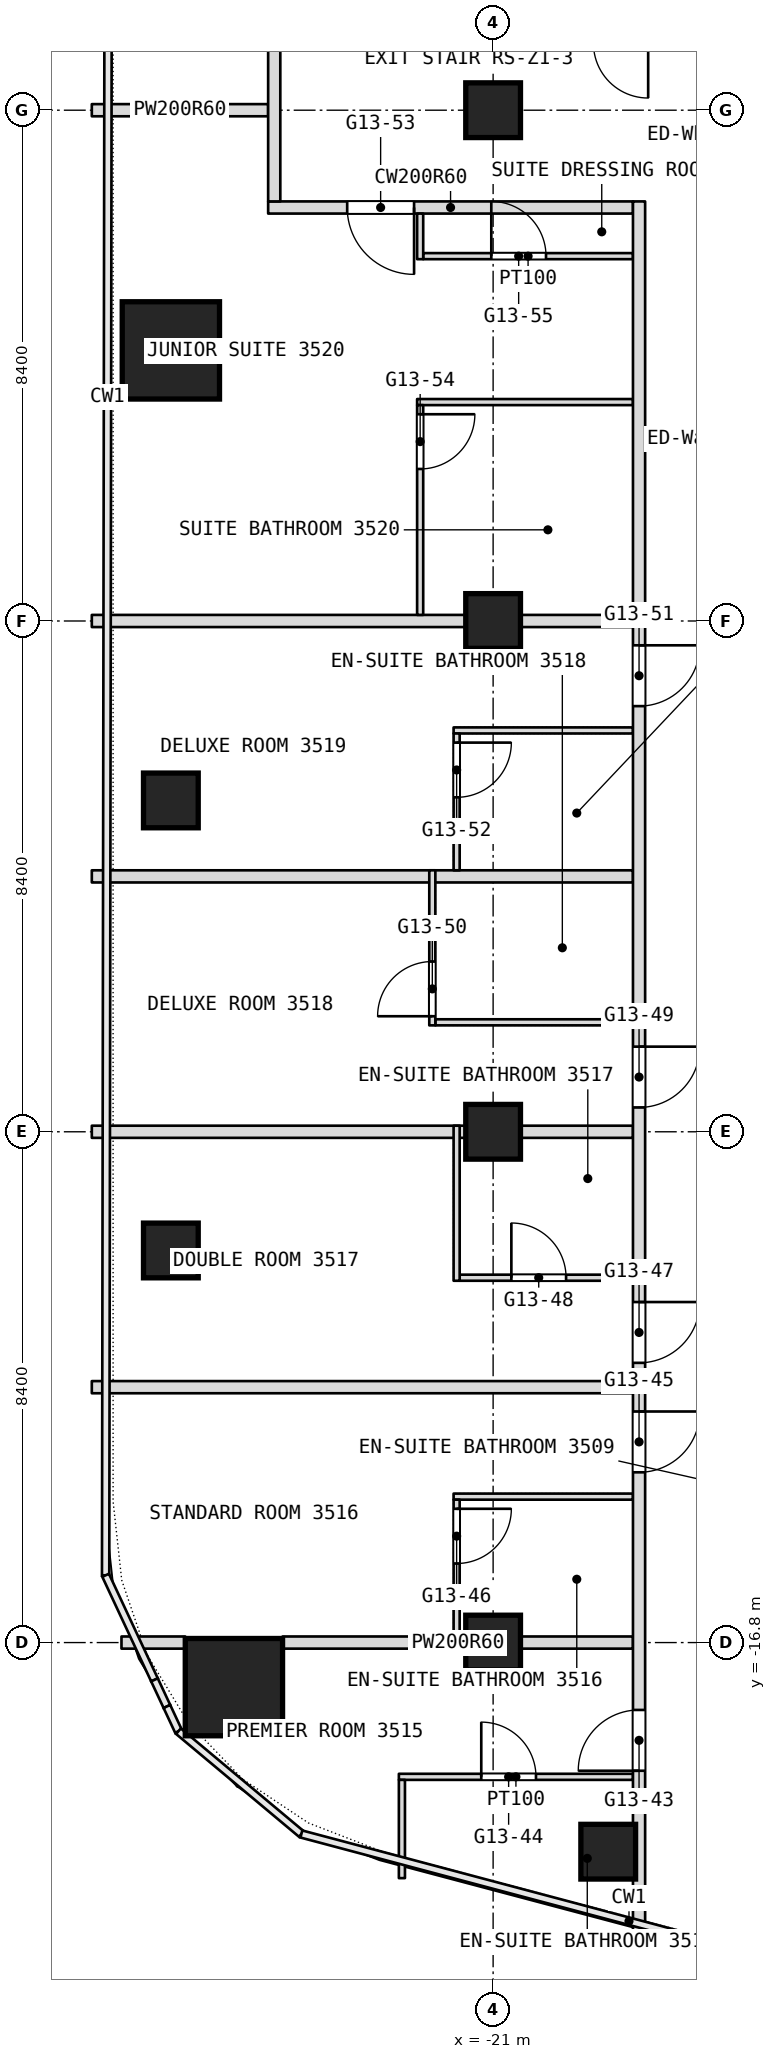
"""IFC4 building model, lengths in metres.
Left out: names, types, materials, properties, quantities, classifications, styles, units other than length and angle.
Written with IfcOpenShell. Run it as: python <this file> out.ifc"""

import sys

from ifc_helpers import new_model, si_unit, direction, frame, frame_2d, origin, origin_2d, place, context, subcontext, project, spatial, rectangle, extrude, element, fill, save


model = new_model("IFC4")
c1 = context("Model", 3, precision=1e-05, world=origin(), true_north=direction((0.0, 1.0)))
c2 = subcontext(c1, "Body", "Model", "MODEL_VIEW")
j1 = project(units=[si_unit("LENGTHUNIT", "METRE"), si_unit("PLANEANGLEUNIT", "RADIAN")], contexts=[c1])
p1 = place(None, origin())
s1 = spatial("IfcSite", under=j1, at=p1, CompositionType="ELEMENT")
p2 = place(p1, origin())
s2 = spatial("IfcBuilding", under=s1, at=p2, CompositionType="ELEMENT")
p3 = place(p2, frame((0.0, 0.0, 151.7)))
s3 = spatial("IfcBuildingStorey", under=s2, at=p3, CompositionType="ELEMENT", Elevation=151.7)
for number, where, z_axis, x_axis in (
    (1, (-25.263, -17.533, 0.0), (0.0, 0.0, 1.0), (1.0, 0.0, 0.0)),
    (2, (-26.3, 4.45, 0.0), (0.0, 0.0, 1.0), (1.0, 0.0, 0.0)),
):
    element("IfcColumn", number, at=place(p3, frame(where, z_axis=z_axis, x_axis=x_axis)), inside=s3, PredefinedType="COLUMN", context=c2, shape_type="SweptSolid", body=[
        extrude(rectangle(XDim=1.6, YDim=1.6, at=origin_2d()), origin(), (0.0, 0.0, 1.0), 3.6),
    ])
for number, where, z_axis, x_axis in (
    (3, (-21.0, -16.8, 0.0), (0.0, 0.0, 1.0), (1.0, 0.0, 0.0)),
    (4, (-21.0, -8.4, 0.0), (0.0, 0.0, 1.0), (1.0, 0.0, 0.0)),
    (5, (-21.0, 0.0, 0.0), (0.0, 0.0, 1.0), (1.0, 0.0, 0.0)),
    (6, (-21.0, 8.4, 0.0), (0.0, 0.0, 1.0), (1.0, 0.0, 0.0)),
    (7, (-26.3, -10.352, 0.0), (0.0, 0.0, 1.0), (1.0, 0.0, 0.0)),
    (8, (-26.3, -2.951, 0.0), (0.0, 0.0, 1.0), (1.0, 0.0, 0.0)),
    (9, (-19.107, -20.239, 0.0), (0.0, 0.0, 1.0), (1.0, 0.0, 0.0)),
):
    element("IfcColumn", number, at=place(p3, frame(where, z_axis=z_axis, x_axis=x_axis)), inside=s3, PredefinedType="COLUMN", context=c2, shape_type="SweptSolid", body=[
        extrude(rectangle(XDim=0.9, YDim=0.9, at=origin_2d()), origin(), (0.0, 0.0, 1.0), 3.6),
    ])
p4 = place(p3, frame((-22.55, -19.008, 0.0), z_axis=(0.0, 0.0, 1.0), x_axis=(1.0, 0.0, 0.0)))
e10 = element("IfcWall", 10, at=p4, inside=s3, PredefinedType="PARTITIONING", context=c2, shape_type="SweptSolid", body=[
    extrude(rectangle(XDim=3.85, YDim=0.1, at=frame_2d((1.925, 0.0))), origin(), (0.0, 0.0, 1.0), 3.34),
])
p5 = place(p4, frame((1.355, 0.0, 0.0)))
e11 = element("IfcOpeningElement", 11, at=p5, cuts=e10, PredefinedType="OPENING", context=c2, shape_type="SweptSolid", body=[
    extrude(rectangle(XDim=0.9, YDim=2.1, at=frame_2d((0.45, 1.05))), frame((0.0, 0.05, 0.0), z_axis=(0.0, -1.0, 0.0), x_axis=(1.0, 0.0, 0.0)), (0.0, 0.0, 1.0), 0.1),
])
p6 = place(p3, frame((-27.112, -16.8, 0.0), z_axis=(0.0, 0.0, 1.0), x_axis=(1.0, 0.0, 0.0)))
e12 = element("IfcWall", 12, at=p6, inside=s3, PredefinedType="PARTITIONING", context=c2, shape_type="SweptSolid", body=[
    extrude(rectangle(XDim=1.049, YDim=0.2, at=frame_2d((0.524, 0.0))), origin(), (0.0, 0.0, 1.0), 3.34),
])
p7 = place(p3, frame((-24.463, -16.8, 0.0), z_axis=(0.0, 0.0, 1.0), x_axis=(1.0, 0.0, 0.0)))
e13 = element("IfcWall", 13, at=p7, inside=s3, PredefinedType="PARTITIONING", context=c2, shape_type="SweptSolid", body=[
    extrude(rectangle(XDim=5.763, YDim=0.2, at=frame_2d((2.881, 0.0))), origin(), (0.0, 0.0, 1.0), 2.89),
])
p8 = place(p3, frame((-21.65, -14.4, 0.0), z_axis=(0.0, 0.0, 1.0), x_axis=(1.0, 0.0, 0.0)))
e14 = element("IfcWall", 14, at=p8, inside=s3, PredefinedType="PARTITIONING", context=c2, shape_type="SweptSolid", body=[
    extrude(rectangle(XDim=2.95, YDim=0.1, at=frame_2d((1.475, 0.0))), origin(), (0.0, 0.0, 1.0), 3.34),
])
p9 = place(p3, frame((-27.6, -12.6, 0.0), z_axis=(0.0, 0.0, 1.0), x_axis=(1.0, 0.0, 0.0)))
e15 = element("IfcWall", 15, at=p9, inside=s3, PredefinedType="PARTITIONING", context=c2, shape_type="SweptSolid", body=[
    extrude(rectangle(XDim=8.9, YDim=0.2, at=frame_2d((4.45, 0.0))), origin(), (0.0, 0.0, 1.0), 3.34),
])
p10 = place(p3, frame((-21.55, -10.8, 0.0), z_axis=(0.0, 0.0, 1.0), x_axis=(1.0, 0.0, 0.0)))
e16 = element("IfcWall", 16, at=p10, inside=s3, PredefinedType="PARTITIONING", context=c2, shape_type="SweptSolid", body=[
    extrude(rectangle(XDim=2.85, YDim=0.1, at=frame_2d((1.425, 0.0))), origin(), (0.0, 0.0, 1.0), 3.34),
])
p11 = place(p10, frame((0.85, 0.0, 0.0)))
e17 = element("IfcOpeningElement", 17, at=p11, cuts=e16, PredefinedType="OPENING", context=c2, shape_type="SweptSolid", body=[
    extrude(rectangle(XDim=0.9, YDim=2.1, at=frame_2d((0.45, 1.05))), frame((0.0, 0.05, 0.0), z_axis=(0.0, -1.0, 0.0), x_axis=(1.0, 0.0, 0.0)), (0.0, 0.0, 1.0), 0.1),
])
p12 = place(p3, frame((-27.6, -8.4, 0.0), z_axis=(0.0, 0.0, 1.0), x_axis=(1.0, 0.0, 0.0)))
e18 = element("IfcWall", 18, at=p12, inside=s3, PredefinedType="PARTITIONING", context=c2, shape_type="SweptSolid", body=[
    extrude(rectangle(XDim=8.9, YDim=0.2, at=frame_2d((4.45, 0.0))), origin(), (0.0, 0.0, 1.0), 2.89),
])
p13 = place(p3, frame((-21.95, -6.6, 0.0), z_axis=(0.0, 0.0, 1.0), x_axis=(1.0, 0.0, 0.0)))
e19 = element("IfcWall", 19, at=p13, inside=s3, PredefinedType="PARTITIONING", context=c2, shape_type="SweptSolid", body=[
    extrude(rectangle(XDim=3.25, YDim=0.1, at=frame_2d((1.625, 0.0))), origin(), (0.0, 0.0, 1.0), 3.34),
])
p14 = place(p3, frame((-27.6, -4.2, 0.0), z_axis=(0.0, 0.0, 1.0), x_axis=(1.0, 0.0, 0.0)))
e20 = element("IfcWall", 20, at=p14, inside=s3, PredefinedType="PARTITIONING", context=c2, shape_type="SweptSolid", body=[
    extrude(rectangle(XDim=8.9, YDim=0.2, at=frame_2d((4.45, 0.0))), origin(), (0.0, 0.0, 1.0), 3.34),
])
p15 = place(p3, frame((-21.65, -1.8, 0.0), z_axis=(0.0, 0.0, 1.0), x_axis=(1.0, 0.0, 0.0)))
e21 = element("IfcWall", 21, at=p15, inside=s3, PredefinedType="PARTITIONING", context=c2, shape_type="SweptSolid", body=[
    extrude(rectangle(XDim=2.95, YDim=0.1, at=frame_2d((1.475, 0.0))), origin(), (0.0, 0.0, 1.0), 3.34),
])
p16 = place(p3, frame((-27.6, 0.0, 0.0), z_axis=(0.0, 0.0, 1.0), x_axis=(1.0, 0.0, 0.0)))
e22 = element("IfcWall", 22, at=p16, inside=s3, PredefinedType="PARTITIONING", context=c2, shape_type="SweptSolid", body=[
    extrude(rectangle(XDim=8.9, YDim=0.2, at=frame_2d((4.45, 0.0))), origin(), (0.0, 0.0, 1.0), 2.89),
])
p17 = place(p3, frame((-22.25, 3.6, 0.0), z_axis=(0.0, 0.0, 1.0), x_axis=(1.0, 0.0, 0.0)))
e23 = element("IfcWall", 23, at=p17, inside=s3, PredefinedType="PARTITIONING", context=c2, shape_type="SweptSolid", body=[
    extrude(rectangle(XDim=3.55, YDim=0.1, at=frame_2d((1.775, 0.0))), origin(), (0.0, 0.0, 1.0), 3.34),
])
p18 = place(p3, frame((-22.15, 6.0, 0.0), z_axis=(0.0, 0.0, 1.0), x_axis=(1.0, 0.0, 0.0)))
e24 = element("IfcWall", 24, at=p18, inside=s3, PredefinedType="PARTITIONING", context=c2, shape_type="SweptSolid", body=[
    extrude(rectangle(XDim=3.45, YDim=0.1, at=frame_2d((1.725, 0.0))), origin(), (0.0, 0.0, 1.0), 3.34),
])
p19 = place(p18, frame((1.12, 0.0, 0.0)))
e25 = element("IfcOpeningElement", 25, at=p19, cuts=e24, PredefinedType="OPENING", context=c2, shape_type="SweptSolid", body=[
    extrude(rectangle(XDim=0.9, YDim=2.1, at=frame_2d((0.45, 1.05))), frame((0.0, 0.05, 0.0), z_axis=(0.0, -1.0, 0.0), x_axis=(1.0, 0.0, 0.0)), (0.0, 0.0, 1.0), 0.1),
])
p20 = place(p3, frame((-24.7, 6.8, 0.0), z_axis=(0.0, 0.0, 1.0), x_axis=(1.0, 0.0, 0.0)))
e26 = element("IfcWall", 26, at=p20, inside=s3, PredefinedType="PARTITIONING", context=c2, shape_type="SweptSolid", body=[
    extrude(rectangle(XDim=6.0, YDim=0.2, at=frame_2d((3.0, 0.0))), origin(), (0.0, 0.0, 1.0), 3.34),
])
p21 = place(p20, frame((1.3, 0.0, 0.0)))
e27 = element("IfcOpeningElement", 27, at=p21, cuts=e26, PredefinedType="OPENING", context=c2, shape_type="SweptSolid", body=[
    extrude(rectangle(XDim=1.1, YDim=2.1, at=frame_2d((0.55, 1.05))), frame((0.0, 0.1, 0.0), z_axis=(0.0, -1.0, 0.0), x_axis=(1.0, 0.0, 0.0)), (0.0, 0.0, 1.0), 0.2),
])
p22 = place(p3, frame((-27.6, 8.4, 0.0), z_axis=(0.0, 0.0, 1.0), x_axis=(1.0, 0.0, 0.0)))
e28 = element("IfcWall", 28, at=p22, inside=s3, PredefinedType="PARTITIONING", context=c2, shape_type="SweptSolid", body=[
    extrude(rectangle(XDim=2.9, YDim=0.2, at=frame_2d((1.45, 0.0))), origin(), (0.0, 0.0, 1.0), 2.89),
])
p23 = place(p3, frame((-18.6, -21.708, 0.0), z_axis=(0.0, 0.0, 1.0), x_axis=(0.0, 1.0, 0.0)))
e29 = element("IfcWall", 29, at=p23, inside=s3, PredefinedType="PARTITIONING", context=c2, shape_type="SweptSolid", body=[
    extrude(rectangle(XDim=28.608, YDim=0.2, at=frame_2d((14.304, 0.0))), origin(), (0.0, 0.0, 1.0), 3.34),
])
p24 = place(p23, frame((2.8, 0.0, 0.0)))
e30 = element("IfcOpeningElement", 30, at=p24, cuts=e29, PredefinedType="OPENING", context=c2, shape_type="SweptSolid", body=[
    extrude(rectangle(XDim=1.0, YDim=2.1, at=frame_2d((0.5, 1.05))), frame((0.0, 0.1, 0.0), z_axis=(0.0, -1.0, 0.0), x_axis=(1.0, 0.0, 0.0)), (0.0, 0.0, 1.0), 0.2),
])
p25 = place(p23, frame((7.708, 0.0, 0.0)))
e31 = element("IfcOpeningElement", 31, at=p25, cuts=e29, PredefinedType="OPENING", context=c2, shape_type="SweptSolid", body=[
    extrude(rectangle(XDim=1.0, YDim=2.1, at=frame_2d((0.5, 1.05))), frame((0.0, 0.1, 0.0), z_axis=(0.0, -1.0, 0.0), x_axis=(1.0, 0.0, 0.0)), (0.0, 0.0, 1.0), 0.2),
])
p26 = place(p23, frame((9.508, 0.0, 0.0)))
e32 = element("IfcOpeningElement", 32, at=p26, cuts=e29, PredefinedType="OPENING", context=c2, shape_type="SweptSolid", body=[
    extrude(rectangle(XDim=1.0, YDim=2.1, at=frame_2d((0.5, 1.05))), frame((0.0, 0.1, 0.0), z_axis=(0.0, -1.0, 0.0), x_axis=(1.0, 0.0, 0.0)), (0.0, 0.0, 1.0), 0.2),
])
p27 = place(p23, frame((13.708, 0.0, 0.0)))
e33 = element("IfcOpeningElement", 33, at=p27, cuts=e29, PredefinedType="OPENING", context=c2, shape_type="SweptSolid", body=[
    extrude(rectangle(XDim=1.0, YDim=2.1, at=frame_2d((0.5, 1.05))), frame((0.0, 0.1, 0.0), z_axis=(0.0, -1.0, 0.0), x_axis=(1.0, 0.0, 0.0)), (0.0, 0.0, 1.0), 0.2),
])
p28 = place(p23, frame((20.308, 0.0, 0.0)))
e34 = element("IfcOpeningElement", 34, at=p28, cuts=e29, PredefinedType="OPENING", context=c2, shape_type="SweptSolid", body=[
    extrude(rectangle(XDim=1.0, YDim=2.1, at=frame_2d((0.5, 1.05))), frame((0.0, 0.1, 0.0), z_axis=(0.0, -1.0, 0.0), x_axis=(1.0, 0.0, 0.0)), (0.0, 0.0, 1.0), 0.2),
])
p29 = place(p3, frame((-21.6, -16.7, 0.0), z_axis=(0.0, 0.0, 1.0), x_axis=(0.0, 1.0, 0.0)))
e35 = element("IfcWall", 35, at=p29, inside=s3, PredefinedType="PARTITIONING", context=c2, shape_type="SweptSolid", body=[
    extrude(rectangle(XDim=2.25, YDim=0.1, at=frame_2d((1.125, 0.0))), origin(), (0.0, 0.0, 1.0), 3.34),
])
p30 = place(p29, frame((1.2, 0.0, 0.0)))
e36 = element("IfcOpeningElement", 36, at=p30, cuts=e35, PredefinedType="OPENING", context=c2, shape_type="SweptSolid", body=[
    extrude(rectangle(XDim=0.9, YDim=2.1, at=frame_2d((0.45, 1.05))), frame((0.0, 0.05, 0.0), z_axis=(0.0, -1.0, 0.0), x_axis=(1.0, 0.0, 0.0)), (0.0, 0.0, 1.0), 0.1),
])
p31 = place(p3, frame((-21.6, -10.85, 0.0), z_axis=(0.0, 0.0, 1.0), x_axis=(0.0, 1.0, 0.0)))
e37 = element("IfcWall", 37, at=p31, inside=s3, PredefinedType="PARTITIONING", context=c2, shape_type="SweptSolid", body=[
    extrude(rectangle(XDim=2.55, YDim=0.1, at=frame_2d((1.275, 0.0))), origin(), (0.0, 0.0, 1.0), 3.34),
])
p32 = place(p3, frame((-21.6, -4.1, 0.0), z_axis=(0.0, 0.0, 1.0), x_axis=(0.0, 1.0, 0.0)))
e38 = element("IfcWall", 38, at=p32, inside=s3, PredefinedType="PARTITIONING", context=c2, shape_type="SweptSolid", body=[
    extrude(rectangle(XDim=2.25, YDim=0.1, at=frame_2d((1.125, 0.0))), origin(), (0.0, 0.0, 1.0), 3.34),
])
p33 = place(p32, frame((1.2, 0.0, 0.0)))
e39 = element("IfcOpeningElement", 39, at=p33, cuts=e38, PredefinedType="OPENING", context=c2, shape_type="SweptSolid", body=[
    extrude(rectangle(XDim=0.9, YDim=2.1, at=frame_2d((0.45, 1.05))), frame((0.0, 0.05, 0.0), z_axis=(0.0, -1.0, 0.0), x_axis=(1.0, 0.0, 0.0)), (0.0, 0.0, 1.0), 0.1),
])
p34 = place(p3, frame((-22.0, -6.65, 0.0), z_axis=(0.0, 0.0, 1.0), x_axis=(0.0, 1.0, 0.0)))
e40 = element("IfcWall", 40, at=p34, inside=s3, PredefinedType="PARTITIONING", context=c2, shape_type="SweptSolid", body=[
    extrude(rectangle(XDim=2.55, YDim=0.1, at=frame_2d((1.275, 0.0))), origin(), (0.0, 0.0, 1.0), 3.34),
])
p35 = place(p34, frame((0.15, 0.0, 0.0)))
e41 = element("IfcOpeningElement", 41, at=p35, cuts=e40, PredefinedType="OPENING", context=c2, shape_type="SweptSolid", body=[
    extrude(rectangle(XDim=0.9, YDim=2.1, at=frame_2d((0.45, 1.05))), frame((0.0, 0.05, 0.0), z_axis=(0.0, -1.0, 0.0), x_axis=(1.0, 0.0, 0.0)), (0.0, 0.0, 1.0), 0.1),
])
p36 = place(p3, frame((-22.2, 0.1, 0.0), z_axis=(0.0, 0.0, 1.0), x_axis=(0.0, 1.0, 0.0)))
e42 = element("IfcWall", 42, at=p36, inside=s3, PredefinedType="PARTITIONING", context=c2, shape_type="SweptSolid", body=[
    extrude(rectangle(XDim=3.45, YDim=0.1, at=frame_2d((1.725, 0.0))), origin(), (0.0, 0.0, 1.0), 3.34),
])
p37 = place(p36, frame((2.4, 0.0, 0.0)))
e43 = element("IfcOpeningElement", 43, at=p37, cuts=e42, PredefinedType="OPENING", context=c2, shape_type="SweptSolid", body=[
    extrude(rectangle(XDim=0.9, YDim=2.1, at=frame_2d((0.45, 1.05))), frame((0.0, 0.05, 0.0), z_axis=(0.0, -1.0, 0.0), x_axis=(1.0, 0.0, 0.0)), (0.0, 0.0, 1.0), 0.1),
])
p38 = place(p3, frame((-22.2, 5.95, 0.0), z_axis=(0.0, 0.0, 1.0), x_axis=(0.0, 1.0, 0.0)))
e44 = element("IfcWall", 44, at=p38, inside=s3, PredefinedType="PARTITIONING", context=c2, shape_type="SweptSolid", body=[
    extrude(rectangle(XDim=0.75, YDim=0.1, at=frame_2d((0.375, 0.0))), origin(), (0.0, 0.0, 1.0), 3.34),
])
p39 = place(p3, frame((-22.5, -20.674, 0.0), z_axis=(0.0, 0.0, 1.0), x_axis=(0.0, 1.0, 0.0)))
e45 = element("IfcWall", 45, at=p39, inside=s3, PredefinedType="PARTITIONING", context=c2, shape_type="SweptSolid", body=[
    extrude(rectangle(XDim=1.616, YDim=0.1, at=frame_2d((0.808, 0.0))), origin(), (0.0, 0.0, 1.0), 3.34),
])
p40 = place(p3, frame((-24.6, 6.9, 0.0), z_axis=(0.0, 0.0, 1.0), x_axis=(0.0, 1.0, 0.0)))
e46 = element("IfcWall", 46, at=p40, inside=s3, PredefinedType="PARTITIONING", context=c2, shape_type="SweptSolid", body=[
    extrude(rectangle(XDim=11.6, YDim=0.2, at=frame_2d((5.8, 0.0))), origin(), (0.0, 0.0, 1.0), 3.34),
])
p41 = place(p40, frame((5.45, 0.0, 0.0)))
e47 = element("IfcOpeningElement", 47, at=p41, cuts=e46, PredefinedType="OPENING", context=c2, shape_type="SweptSolid", body=[
    extrude(rectangle(XDim=1.8, YDim=2.1, at=frame_2d((0.9, 1.05))), frame((0.0, 0.1, 0.0), z_axis=(0.0, -1.0, 0.0), x_axis=(1.0, 0.0, 0.0)), (0.0, 0.0, 1.0), 0.2),
])
p42 = place(p5, origin())
e48 = element("IfcDoor", 48, at=p42, inside=s3, OperationType="SINGLE_SWING_LEFT", PredefinedType="DOOR", context=c2, shape_type="SweptSolid", body=[
    extrude(rectangle(XDim=0.9, YDim=2.1, at=frame_2d((0.45, 1.05))), frame((0.0, 0.025, 0.0), z_axis=(0.0, -1.0, 0.0), x_axis=(1.0, 0.0, 0.0)), (0.0, 0.0, 1.0), 0.05),
])
fill(e11, e48)
p43 = place(p11, origin())
e49 = element("IfcDoor", 49, at=p43, inside=s3, OperationType="SINGLE_SWING_LEFT", PredefinedType="DOOR", context=c2, shape_type="SweptSolid", body=[
    extrude(rectangle(XDim=0.9, YDim=2.1, at=frame_2d((0.45, 1.05))), frame((0.0, 0.025, 0.0), z_axis=(0.0, -1.0, 0.0), x_axis=(1.0, 0.0, 0.0)), (0.0, 0.0, 1.0), 0.05),
])
fill(e17, e49)
p44 = place(p19, origin())
e50 = element("IfcDoor", 50, at=p44, inside=s3, OperationType="SINGLE_SWING_RIGHT", PredefinedType="DOOR", context=c2, shape_type="SweptSolid", body=[
    extrude(rectangle(XDim=0.9, YDim=2.1, at=frame_2d((0.45, 1.05))), frame((0.0, 0.025, 0.0), z_axis=(0.0, -1.0, 0.0), x_axis=(1.0, 0.0, 0.0)), (0.0, 0.0, 1.0), 0.05),
])
fill(e25, e50)
p45 = place(p21, origin())
e51 = element("IfcDoor", 51, at=p45, inside=s3, OperationType="SINGLE_SWING_LEFT", PredefinedType="DOOR", context=c2, shape_type="SweptSolid", body=[
    extrude(rectangle(XDim=1.1, YDim=2.1, at=frame_2d((0.55, 1.05))), frame((0.0, 0.025, 0.0), z_axis=(0.0, -1.0, 0.0), x_axis=(1.0, 0.0, 0.0)), (0.0, 0.0, 1.0), 0.05),
])
fill(e27, e51)
p46 = place(p24, origin())
e52 = element("IfcDoor", 52, at=p46, inside=s3, OperationType="SINGLE_SWING_LEFT", PredefinedType="DOOR", context=c2, shape_type="SweptSolid", body=[
    extrude(rectangle(XDim=1.0, YDim=2.1, at=frame_2d((0.5, 1.05))), frame((0.0, 0.025, 0.0), z_axis=(0.0, -1.0, 0.0), x_axis=(1.0, 0.0, 0.0)), (0.0, 0.0, 1.0), 0.05),
])
fill(e30, e52)
p47 = place(p25, origin())
e53 = element("IfcDoor", 53, at=p47, inside=s3, OperationType="SINGLE_SWING_RIGHT", PredefinedType="DOOR", context=c2, shape_type="SweptSolid", body=[
    extrude(rectangle(XDim=1.0, YDim=2.1, at=frame_2d((0.5, 1.05))), frame((0.0, 0.025, 0.0), z_axis=(0.0, -1.0, 0.0), x_axis=(1.0, 0.0, 0.0)), (0.0, 0.0, 1.0), 0.05),
])
fill(e31, e53)
p48 = place(p26, origin())
e54 = element("IfcDoor", 54, at=p48, inside=s3, OperationType="SINGLE_SWING_RIGHT", PredefinedType="DOOR", context=c2, shape_type="SweptSolid", body=[
    extrude(rectangle(XDim=1.0, YDim=2.1, at=frame_2d((0.5, 1.05))), frame((0.0, 0.025, 0.0), z_axis=(0.0, -1.0, 0.0), x_axis=(1.0, 0.0, 0.0)), (0.0, 0.0, 1.0), 0.05),
])
fill(e32, e54)
p49 = place(p27, origin())
e55 = element("IfcDoor", 55, at=p49, inside=s3, OperationType="SINGLE_SWING_RIGHT", PredefinedType="DOOR", context=c2, shape_type="SweptSolid", body=[
    extrude(rectangle(XDim=1.0, YDim=2.1, at=frame_2d((0.5, 1.05))), frame((0.0, 0.025, 0.0), z_axis=(0.0, -1.0, 0.0), x_axis=(1.0, 0.0, 0.0)), (0.0, 0.0, 1.0), 0.05),
])
fill(e33, e55)
p50 = place(p28, origin())
e56 = element("IfcDoor", 56, at=p50, inside=s3, OperationType="SINGLE_SWING_RIGHT", PredefinedType="DOOR", context=c2, shape_type="SweptSolid", body=[
    extrude(rectangle(XDim=1.0, YDim=2.1, at=frame_2d((0.5, 1.05))), frame((0.0, 0.025, 0.0), z_axis=(0.0, -1.0, 0.0), x_axis=(1.0, 0.0, 0.0)), (0.0, 0.0, 1.0), 0.05),
])
fill(e34, e56)
p51 = place(p30, origin())
e57 = element("IfcDoor", 57, at=p51, inside=s3, OperationType="SINGLE_SWING_LEFT", PredefinedType="DOOR", context=c2, shape_type="SweptSolid", body=[
    extrude(rectangle(XDim=0.9, YDim=2.1, at=frame_2d((0.45, 1.05))), frame((0.0, 0.025, 0.0), z_axis=(0.0, -1.0, 0.0), x_axis=(1.0, 0.0, 0.0)), (0.0, 0.0, 1.0), 0.05),
])
fill(e36, e57)
p52 = place(p33, origin())
e58 = element("IfcDoor", 58, at=p52, inside=s3, OperationType="SINGLE_SWING_LEFT", PredefinedType="DOOR", context=c2, shape_type="SweptSolid", body=[
    extrude(rectangle(XDim=0.9, YDim=2.1, at=frame_2d((0.45, 1.05))), frame((0.0, 0.025, 0.0), z_axis=(0.0, -1.0, 0.0), x_axis=(1.0, 0.0, 0.0)), (0.0, 0.0, 1.0), 0.05),
])
fill(e39, e58)
p53 = place(p35, origin())
e59 = element("IfcDoor", 59, at=p53, inside=s3, OperationType="SINGLE_SWING_RIGHT", PredefinedType="DOOR", context=c2, shape_type="SweptSolid", body=[
    extrude(rectangle(XDim=0.9, YDim=2.1, at=frame_2d((0.45, 1.05))), frame((0.0, 0.025, 0.0), z_axis=(0.0, -1.0, 0.0), x_axis=(1.0, 0.0, 0.0)), (0.0, 0.0, 1.0), 0.05),
])
fill(e41, e59)
p54 = place(p37, origin())
e60 = element("IfcDoor", 60, at=p54, inside=s3, OperationType="SINGLE_SWING_LEFT", PredefinedType="DOOR", context=c2, shape_type="SweptSolid", body=[
    extrude(rectangle(XDim=0.9, YDim=2.1, at=frame_2d((0.45, 1.05))), frame((0.0, 0.025, 0.0), z_axis=(0.0, -1.0, 0.0), x_axis=(1.0, 0.0, 0.0)), (0.0, 0.0, 1.0), 0.05),
])
fill(e43, e60)
save(model, sys.argv[1])
